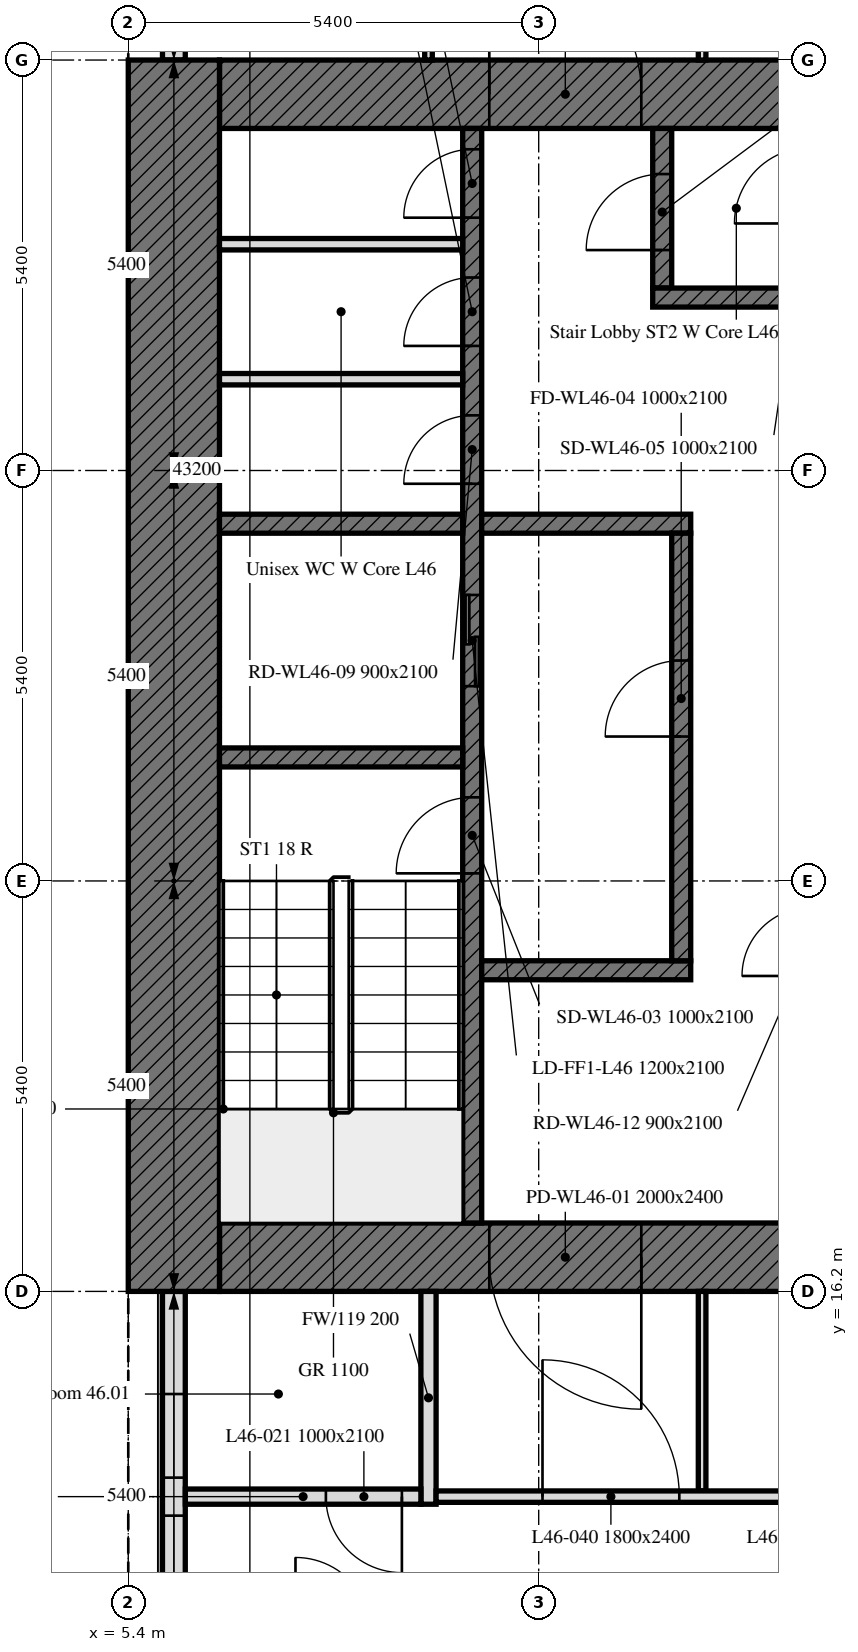
"""IFC4 building model, lengths in metres.
Left out: names, types, materials, properties, quantities, classifications, styles, units other than length and angle.
Written with IfcOpenShell. Run it as: python <this file> out.ifc"""

import sys

from ifc_helpers import new_model, si_unit, direction, frame, frame_2d, origin, place, context, subcontext, project, spatial, rectangle, extrude, element, fill, save


model = new_model("IFC4")
c1 = context("Model", 3, precision=1e-05, world=origin(), true_north=direction((0.0, 1.0)))
c2 = subcontext(c1, "Body", "Model", "MODEL_VIEW")
j1 = project(units=[si_unit("LENGTHUNIT", "METRE"), si_unit("PLANEANGLEUNIT", "RADIAN")], contexts=[c1])
p1 = place(None, origin())
s1 = spatial("IfcSite", under=j1, at=p1, CompositionType="ELEMENT")
p2 = place(p1, origin())
s2 = spatial("IfcBuilding", under=s1, at=p2, CompositionType="ELEMENT")
p3 = place(p2, frame((0.0, 0.0, 190.6)))
s3 = spatial("IfcBuildingStorey", under=s2, at=p3, CompositionType="ELEMENT", Elevation=190.6)
p4 = place(p3, frame((6.0, 43.014, 0.0), z_axis=(0.0, 0.0, 1.0), x_axis=(0.0, -1.0, 0.0)))
e1 = element("IfcWall", 1, at=p4, inside=s3, PredefinedType="SOLIDWALL", context=c2, shape_type="SweptSolid", body=[
    extrude(rectangle(XDim=10.614, YDim=0.3, at=frame_2d((5.307, 0.0))), origin(), (0.0, 0.0, 1.0), 3.0),
])
p5 = place(p4, frame((1.789, 0.0, 0.9)))
e2 = element("IfcOpeningElement", 2, at=p5, cuts=e1, PredefinedType="OPENING", context=c2, shape_type="SweptSolid", body=[
    extrude(rectangle(XDim=0.65, YDim=1.7, at=frame_2d((0.325, 0.85))), frame((0.0, 0.16, 0.0), z_axis=(0.0, -1.0, 0.0), x_axis=(1.0, 0.0, 0.0)), (0.0, 0.0, 1.0), 0.32),
])
p6 = place(p4, frame((2.589, 0.0, 0.9)))
e3 = element("IfcOpeningElement", 3, at=p6, cuts=e1, PredefinedType="OPENING", context=c2, shape_type="SweptSolid", body=[
    extrude(rectangle(XDim=0.65, YDim=1.7, at=frame_2d((0.325, 0.85))), frame((0.0, 0.16, 0.0), z_axis=(0.0, -1.0, 0.0), x_axis=(1.0, 0.0, 0.0)), (0.0, 0.0, 1.0), 0.32),
])
p7 = place(p4, frame((6.214, 0.0, 0.9)))
e4 = element("IfcOpeningElement", 4, at=p7, cuts=e1, PredefinedType="OPENING", context=c2, shape_type="SweptSolid", body=[
    extrude(rectangle(XDim=3.4, YDim=1.7, at=frame_2d((1.7, 0.85))), frame((0.0, 0.16, 0.0), z_axis=(0.0, -1.0, 0.0), x_axis=(1.0, 0.0, 0.0)), (0.0, 0.0, 1.0), 0.32),
])
p8 = place(p3, frame((6.0, 16.2, 0.0), z_axis=(0.0, 0.0, 1.0), x_axis=(0.0, -1.0, 0.0)))
e5 = element("IfcWall", 5, at=p8, inside=s3, PredefinedType="SOLIDWALL", context=c2, shape_type="SweptSolid", body=[
    extrude(rectangle(XDim=5.214, YDim=0.3, at=frame_2d((2.607, 0.0))), origin(), (0.0, 0.0, 1.0), 3.0),
])
p9 = place(p8, frame((1.35, 0.0, 0.9)))
e6 = element("IfcOpeningElement", 6, at=p9, cuts=e5, PredefinedType="OPENING", context=c2, shape_type="SweptSolid", body=[
    extrude(rectangle(XDim=1.1, YDim=1.7, at=frame_2d((0.55, 0.85))), frame((0.0, 0.16, 0.0), z_axis=(0.0, -1.0, 0.0), x_axis=(1.0, 0.0, 0.0)), (0.0, 0.0, 1.0), 0.32),
])
p10 = place(p8, frame((2.95, 0.0, 0.9)))
e7 = element("IfcOpeningElement", 7, at=p10, cuts=e5, PredefinedType="OPENING", context=c2, shape_type="SweptSolid", body=[
    extrude(rectangle(XDim=1.1, YDim=1.7, at=frame_2d((0.55, 0.85))), frame((0.0, 0.16, 0.0), z_axis=(0.0, -1.0, 0.0), x_axis=(1.0, 0.0, 0.0)), (0.0, 0.0, 1.0), 0.32),
])
p11 = place(p3, frame((17.7, 16.65, 0.0), z_axis=(0.0, 0.0, 1.0), x_axis=(-1.0, 0.0, 0.0)))
e8 = element("IfcWall", 8, at=p11, inside=s3, PredefinedType="SOLIDWALL", context=c2, shape_type="SweptSolid", body=[
    extrude(rectangle(XDim=11.1, YDim=0.9, at=frame_2d((5.55, 0.0))), origin(), (0.0, 0.0, 1.0), 3.0),
])
p12 = place(p11, frame((5.55, 0.0, 0.0)))
e9 = element("IfcOpeningElement", 9, at=p12, cuts=e8, PredefinedType="OPENING", context=c2, shape_type="SweptSolid", body=[
    extrude(rectangle(XDim=2.0, YDim=2.4, at=frame_2d((1.0, 1.2))), frame((0.0, 0.45, 0.0), z_axis=(0.0, -1.0, 0.0), x_axis=(1.0, 0.0, 0.0)), (0.0, 0.0, 1.0), 0.9),
])
p13 = place(p3, frame((6.6, 31.95, 0.0), z_axis=(0.0, 0.0, 1.0), x_axis=(1.0, 0.0, 0.0)))
e10 = element("IfcWall", 10, at=p13, inside=s3, PredefinedType="SOLIDWALL", context=c2, shape_type="SweptSolid", body=[
    extrude(rectangle(XDim=11.1, YDim=0.9, at=frame_2d((5.55, 0.0))), origin(), (0.0, 0.0, 1.0), 3.0),
])
p14 = place(p13, frame((3.55, 0.0, 0.0)))
e11 = element("IfcOpeningElement", 11, at=p14, cuts=e10, PredefinedType="OPENING", context=c2, shape_type="SweptSolid", body=[
    extrude(rectangle(XDim=2.0, YDim=2.4, at=frame_2d((1.0, 1.2))), frame((0.0, 0.45, 0.0), z_axis=(0.0, -1.0, 0.0), x_axis=(1.0, 0.0, 0.0)), (0.0, 0.0, 1.0), 0.9),
])
p15 = place(p3, frame((6.0, 16.2, 0.0), z_axis=(0.0, 0.0, 1.0), x_axis=(0.0, 1.0, 0.0)))
e12 = element("IfcWall", 12, at=p15, inside=s3, PredefinedType="SOLIDWALL", context=c2, shape_type="SweptSolid", body=[
    extrude(rectangle(XDim=16.2, YDim=1.2, at=frame_2d((8.1, 0.0))), origin(), (0.0, 0.0, 1.0), 3.0),
])
p16 = place(p3, frame((9.925, 17.1, 0.0), z_axis=(0.0, 0.0, 1.0), x_axis=(0.0, 1.0, 0.0)))
e13 = element("IfcWall", 13, at=p16, inside=s3, PredefinedType="SOLIDWALL", context=c2, shape_type="SweptSolid", body=[
    extrude(rectangle(XDim=14.4, YDim=0.25, at=frame_2d((7.2, 0.0))), origin(), (0.0, 0.0, 1.0), 3.0),
])
p17 = place(p16, frame((4.6, 0.0, 0.0)))
e14 = element("IfcOpeningElement", 14, at=p17, cuts=e13, PredefinedType="OPENING", context=c2, shape_type="SweptSolid", body=[
    extrude(rectangle(XDim=1.0, YDim=2.1, at=frame_2d((0.5, 1.05))), frame((0.0, 0.125, 0.0), z_axis=(0.0, -1.0, 0.0), x_axis=(1.0, 0.0, 0.0)), (0.0, 0.0, 1.0), 0.25),
])
p18 = place(p16, frame((7.062, 0.0, 0.0)))
e15 = element("IfcOpeningElement", 15, at=p18, cuts=e13, PredefinedType="OPENING", context=c2, shape_type="SweptSolid", body=[
    extrude(rectangle(XDim=1.2, YDim=2.1, at=frame_2d((0.6, 1.05))), frame((0.0, 0.125, 0.0), z_axis=(0.0, -1.0, 0.0), x_axis=(1.0, 0.0, 0.0)), (0.0, 0.0, 1.0), 0.25),
])
p19 = place(p16, frame((9.726, 0.0, 0.0)))
e16 = element("IfcOpeningElement", 16, at=p19, cuts=e13, PredefinedType="OPENING", context=c2, shape_type="SweptSolid", body=[
    extrude(rectangle(XDim=0.9, YDim=2.1, at=frame_2d((0.45, 1.05))), frame((0.0, 0.125, 0.0), z_axis=(0.0, -1.0, 0.0), x_axis=(1.0, 0.0, 0.0)), (0.0, 0.0, 1.0), 0.25),
])
p20 = place(p16, frame((11.539, 0.0, 0.0)))
e17 = element("IfcOpeningElement", 17, at=p20, cuts=e13, PredefinedType="OPENING", context=c2, shape_type="SweptSolid", body=[
    extrude(rectangle(XDim=0.9, YDim=2.1, at=frame_2d((0.45, 1.05))), frame((0.0, 0.125, 0.0), z_axis=(0.0, -1.0, 0.0), x_axis=(1.0, 0.0, 0.0)), (0.0, 0.0, 1.0), 0.25),
])
p21 = place(p16, frame((13.226, 0.0, 0.0)))
e18 = element("IfcOpeningElement", 18, at=p21, cuts=e13, PredefinedType="OPENING", context=c2, shape_type="SweptSolid", body=[
    extrude(rectangle(XDim=0.9, YDim=2.1, at=frame_2d((0.45, 1.05))), frame((0.0, 0.125, 0.0), z_axis=(0.0, -1.0, 0.0), x_axis=(1.0, 0.0, 0.0)), (0.0, 0.0, 1.0), 0.25),
])
for number, where, z_axis, x_axis in (
    (19, (6.6, 23.225, 0.0), (0.0, 0.0, 1.0), (1.0, 0.0, 0.0)),
    (20, (6.6, 26.3, 0.0), (0.0, 0.0, 1.0), (1.0, 0.0, 0.0)),
):
    element("IfcWall", number, at=place(p3, frame(where, z_axis=z_axis, x_axis=x_axis)), inside=s3, PredefinedType="SOLIDWALL", context=c2, shape_type="SweptSolid", body=[
        extrude(rectangle(XDim=3.2, YDim=0.25, at=frame_2d((1.6, 0.0))), origin(), (0.0, 0.0, 1.0), 3.0),
    ])
for number, where, z_axis, x_axis in (
    (21, (10.05, 26.3, 0.0), (0.0, 0.0, 1.0), (1.0, 0.0, 0.0)),
    (22, (10.05, 20.425, 0.0), (0.0, 0.0, 1.0), (1.0, 0.0, 0.0)),
):
    element("IfcWall", number, at=place(p3, frame(where, z_axis=z_axis, x_axis=x_axis)), inside=s3, PredefinedType="SOLIDWALL", context=c2, shape_type="SweptSolid", body=[
        extrude(rectangle(XDim=2.75, YDim=0.25, at=frame_2d((1.375, 0.0))), origin(), (0.0, 0.0, 1.0), 3.0),
    ])
p22 = place(p3, frame((12.425, 29.4, 0.0), z_axis=(0.0, 0.0, 1.0), x_axis=(0.0, 1.0, 0.0)))
e23 = element("IfcWall", 23, at=p22, inside=s3, PredefinedType="SOLIDWALL", context=c2, shape_type="SweptSolid", body=[
    extrude(rectangle(XDim=2.1, YDim=0.25, at=frame_2d((1.05, 0.0))), origin(), (0.0, 0.0, 1.0), 3.0),
])
p23 = place(p22, frame((0.5, 0.0, 0.0)))
e24 = element("IfcOpeningElement", 24, at=p23, cuts=e23, PredefinedType="OPENING", context=c2, shape_type="SweptSolid", body=[
    extrude(rectangle(XDim=1.0, YDim=2.1, at=frame_2d((0.5, 1.05))), frame((0.0, 0.125, 0.0), z_axis=(0.0, -1.0, 0.0), x_axis=(1.0, 0.0, 0.0)), (0.0, 0.0, 1.0), 0.25),
])
p24 = place(p3, frame((12.3, 29.275, 0.0), z_axis=(0.0, 0.0, 1.0), x_axis=(1.0, 0.0, 0.0)))
e25 = element("IfcWall", 25, at=p24, inside=s3, PredefinedType="SOLIDWALL", context=c2, shape_type="SweptSolid", body=[
    extrude(rectangle(XDim=1.95, YDim=0.25, at=frame_2d((0.975, 0.0))), origin(), (0.0, 0.0, 1.0), 3.0),
])
p25 = place(p3, frame((12.675, 20.55, 0.0), z_axis=(0.0, 0.0, 1.0), x_axis=(0.0, 1.0, 0.0)))
e26 = element("IfcWall", 26, at=p25, inside=s3, PredefinedType="SOLIDWALL", context=c2, shape_type="SweptSolid", body=[
    extrude(rectangle(XDim=5.625, YDim=0.25, at=frame_2d((2.812, 0.0))), origin(), (0.0, 0.0, 1.0), 3.0),
])
p26 = place(p25, frame((2.95, 0.0, 0.0)))
e27 = element("IfcOpeningElement", 27, at=p26, cuts=e26, PredefinedType="OPENING", context=c2, shape_type="SweptSolid", body=[
    extrude(rectangle(XDim=1.0, YDim=2.1, at=frame_2d((0.5, 1.05))), frame((0.0, 0.125, 0.0), z_axis=(0.0, -1.0, 0.0), x_axis=(1.0, 0.0, 0.0)), (0.0, 0.0, 1.0), 0.25),
])
for number, where, z_axis, x_axis in (
    (28, (6.6, 28.201, 0.0), (0.0, 0.0, 1.0), (1.0, 0.0, 0.0)),
    (29, (6.6, 29.977, 0.0), (0.0, 0.0, 1.0), (1.0, 0.0, 0.0)),
):
    element("IfcWall", number, at=place(p3, frame(where, z_axis=z_axis, x_axis=x_axis)), inside=s3, PredefinedType="PARTITIONING", context=c2, shape_type="SweptSolid", body=[
        extrude(rectangle(XDim=3.2, YDim=0.15, at=frame_2d((1.6, 0.0))), origin(), (0.0, 0.0, 1.0), 3.0),
    ])
for number, where, z_axis, x_axis in (
    (30, (9.35, 39.525, 0.0), (0.0, 0.0, 1.0), (0.0, -1.0, 0.0)),
    (31, (12.95, 32.4, 0.0), (0.0, 0.0, 1.0), (0.0, 1.0, 0.0)),
):
    element("IfcWall", number, at=place(p3, frame(where, z_axis=z_axis, x_axis=x_axis)), inside=s3, PredefinedType="PARTITIONING", context=c2, shape_type="SweptSolid", body=[
        extrude(rectangle(XDim=7.125, YDim=0.1, at=frame_2d((3.562, 0.0))), origin(), (0.0, 0.0, 1.0), 3.0),
    ])
p27 = place(p3, frame((9.35, 16.2, 0.0), z_axis=(0.0, 0.0, 1.0), x_axis=(0.0, -1.0, 0.0)))
e32 = element("IfcWall", 32, at=p27, inside=s3, PredefinedType="PARTITIONING", context=c2, shape_type="SweptSolid", body=[
    extrude(rectangle(XDim=2.8, YDim=0.2, at=frame_2d((1.4, 0.0))), origin(), (0.0, 0.0, 1.0), 3.0),
])
p28 = place(p3, frame((12.95, 13.575, 0.0), z_axis=(0.0, 0.0, 1.0), x_axis=(0.0, 1.0, 0.0)))
e33 = element("IfcWall", 33, at=p28, inside=s3, PredefinedType="PARTITIONING", context=c2, shape_type="SweptSolid", body=[
    extrude(rectangle(XDim=2.625, YDim=0.1, at=frame_2d((1.312, 0.0))), origin(), (0.0, 0.0, 1.0), 3.0),
])
p29 = place(p3, frame((9.45, 13.5, 0.0), z_axis=(0.0, 0.0, 1.0), x_axis=(1.0, 0.0, 0.0)))
e34 = element("IfcWall", 34, at=p29, inside=s3, PredefinedType="PARTITIONING", context=c2, shape_type="SweptSolid", body=[
    extrude(rectangle(XDim=33.675, YDim=0.15, at=frame_2d((16.837, 0.0))), origin(), (0.0, 0.0, 1.0), 3.0),
])
p30 = place(p29, frame((8.95, 0.0, 0.0)))
e35 = element("IfcOpeningElement", 35, at=p30, cuts=e34, PredefinedType="OPENING", context=c2, shape_type="SweptSolid", body=[
    extrude(rectangle(XDim=1.0, YDim=2.1, at=frame_2d((0.5, 1.05))), frame((0.0, 0.075, 0.0), z_axis=(0.0, -1.0, 0.0), x_axis=(1.0, 0.0, 0.0)), (0.0, 0.0, 1.0), 0.15),
])
p31 = place(p29, frame((15.517, 0.0, 0.0)))
e36 = element("IfcOpeningElement", 36, at=p31, cuts=e34, PredefinedType="OPENING", context=c2, shape_type="SweptSolid", body=[
    extrude(rectangle(XDim=1.0, YDim=2.1, at=frame_2d((0.5, 1.05))), frame((0.0, 0.075, 0.0), z_axis=(0.0, -1.0, 0.0), x_axis=(1.0, 0.0, 0.0)), (0.0, 0.0, 1.0), 0.15),
])
p32 = place(p29, frame((24.075, 0.0, 0.0)))
e37 = element("IfcOpeningElement", 37, at=p32, cuts=e34, PredefinedType="OPENING", context=c2, shape_type="SweptSolid", body=[
    extrude(rectangle(XDim=1.0, YDim=2.1, at=frame_2d((0.5, 1.05))), frame((0.0, 0.075, 0.0), z_axis=(0.0, -1.0, 0.0), x_axis=(1.0, 0.0, 0.0)), (0.0, 0.0, 1.0), 0.15),
])
p33 = place(p29, frame((31.275, 0.0, 0.0)))
e38 = element("IfcOpeningElement", 38, at=p33, cuts=e34, PredefinedType="OPENING", context=c2, shape_type="SweptSolid", body=[
    extrude(rectangle(XDim=1.0, YDim=2.1, at=frame_2d((0.5, 1.05))), frame((0.0, 0.075, 0.0), z_axis=(0.0, -1.0, 0.0), x_axis=(1.0, 0.0, 0.0)), (0.0, 0.0, 1.0), 0.15),
])
p34 = place(p29, frame((4.625, 0.0, 0.0)))
e39 = element("IfcOpeningElement", 39, at=p34, cuts=e34, PredefinedType="OPENING", context=c2, shape_type="SweptSolid", body=[
    extrude(rectangle(XDim=1.0, YDim=2.1, at=frame_2d((0.5, 1.05))), frame((0.0, 0.075, 0.0), z_axis=(0.0, -1.0, 0.0), x_axis=(1.0, 0.0, 0.0)), (0.0, 0.0, 1.0), 0.15),
])
p35 = place(p29, frame((1.4, 0.0, 0.0)))
e40 = element("IfcOpeningElement", 40, at=p35, cuts=e34, PredefinedType="OPENING", context=c2, shape_type="SweptSolid", body=[
    extrude(rectangle(XDim=1.8, YDim=2.4, at=frame_2d((0.9, 1.2))), frame((0.0, 0.075, 0.0), z_axis=(0.0, -1.0, 0.0), x_axis=(1.0, 0.0, 0.0)), (0.0, 0.0, 1.0), 0.15),
])
p36 = place(p29, frame((26.5, 0.0, 0.0)))
e41 = element("IfcOpeningElement", 41, at=p36, cuts=e34, PredefinedType="OPENING", context=c2, shape_type="SweptSolid", body=[
    extrude(rectangle(XDim=1.8, YDim=2.4, at=frame_2d((0.9, 1.2))), frame((0.0, 0.075, 0.0), z_axis=(0.0, -1.0, 0.0), x_axis=(1.0, 0.0, 0.0)), (0.0, 0.0, 1.0), 0.15),
])
p37 = place(p3, frame((9.25, 13.5, 0.0), z_axis=(0.0, 0.0, 1.0), x_axis=(-1.0, 0.0, 0.0)))
e42 = element("IfcWall", 42, at=p37, inside=s3, PredefinedType="PARTITIONING", context=c2, shape_type="SweptSolid", body=[
    extrude(rectangle(XDim=3.099, YDim=0.2, at=frame_2d((1.55, 0.0))), origin(), (0.0, 0.0, 1.0), 3.0),
])
p38 = place(p37, frame((0.25, 0.0, 0.0)))
e43 = element("IfcOpeningElement", 43, at=p38, cuts=e42, PredefinedType="OPENING", context=c2, shape_type="SweptSolid", body=[
    extrude(rectangle(XDim=1.0, YDim=2.1, at=frame_2d((0.5, 1.05))), frame((0.0, 0.1, 0.0), z_axis=(0.0, -1.0, 0.0), x_axis=(1.0, 0.0, 0.0)), (0.0, 0.0, 1.0), 0.2),
])
p39 = place(p9, origin())
e44 = element("IfcWindow", 44, at=p39, inside=s3, PartitioningType="SINGLE_PANEL", PredefinedType="WINDOW", context=c2, shape_type="SweptSolid", body=[
    extrude(rectangle(XDim=1.1, YDim=1.7, at=frame_2d((0.55, 0.85))), frame((0.0, 0.03, 0.0), z_axis=(0.0, -1.0, 0.0), x_axis=(1.0, 0.0, 0.0)), (0.0, 0.0, 1.0), 0.06),
])
fill(e6, e44)
p40 = place(p10, origin())
e45 = element("IfcWindow", 45, at=p40, inside=s3, PartitioningType="SINGLE_PANEL", PredefinedType="WINDOW", context=c2, shape_type="SweptSolid", body=[
    extrude(rectangle(XDim=1.1, YDim=1.7, at=frame_2d((0.55, 0.85))), frame((0.0, 0.03, 0.0), z_axis=(0.0, -1.0, 0.0), x_axis=(1.0, 0.0, 0.0)), (0.0, 0.0, 1.0), 0.06),
])
fill(e7, e45)
p41 = place(p12, origin())
e46 = element("IfcDoor", 46, at=p41, inside=s3, OperationType="DOUBLE_DOOR_SINGLE_SWING", PredefinedType="DOOR", context=c2, shape_type="SweptSolid", body=[
    extrude(rectangle(XDim=2.0, YDim=2.4, at=frame_2d((1.0, 1.2))), frame((0.0, 0.025, 0.0), z_axis=(0.0, -1.0, 0.0), x_axis=(1.0, 0.0, 0.0)), (0.0, 0.0, 1.0), 0.05),
])
fill(e9, e46)
p42 = place(p14, origin())
e47 = element("IfcDoor", 47, at=p42, inside=s3, OperationType="DOUBLE_DOOR_SINGLE_SWING", PredefinedType="DOOR", context=c2, shape_type="SweptSolid", body=[
    extrude(rectangle(XDim=2.0, YDim=2.4, at=frame_2d((1.0, 1.2))), frame((0.0, 0.025, 0.0), z_axis=(0.0, -1.0, 0.0), x_axis=(1.0, 0.0, 0.0)), (0.0, 0.0, 1.0), 0.05),
])
fill(e11, e47)
p43 = place(p17, origin())
e48 = element("IfcDoor", 48, at=p43, inside=s3, OperationType="SINGLE_SWING_LEFT", PredefinedType="DOOR", context=c2, shape_type="SweptSolid", body=[
    extrude(rectangle(XDim=1.0, YDim=2.1, at=frame_2d((0.5, 1.05))), frame((0.0, 0.025, 0.0), z_axis=(0.0, -1.0, 0.0), x_axis=(1.0, 0.0, 0.0)), (0.0, 0.0, 1.0), 0.05),
])
fill(e14, e48)
p44 = place(p26, origin())
e49 = element("IfcDoor", 49, at=p44, inside=s3, OperationType="SINGLE_SWING_LEFT", PredefinedType="DOOR", context=c2, shape_type="SweptSolid", body=[
    extrude(rectangle(XDim=1.0, YDim=2.1, at=frame_2d((0.5, 1.05))), frame((0.0, 0.025, 0.0), z_axis=(0.0, -1.0, 0.0), x_axis=(1.0, 0.0, 0.0)), (0.0, 0.0, 1.0), 0.05),
])
fill(e27, e49)
p45 = place(p23, origin())
e50 = element("IfcDoor", 50, at=p45, inside=s3, OperationType="SINGLE_SWING_LEFT", PredefinedType="DOOR", context=c2, shape_type="SweptSolid", body=[
    extrude(rectangle(XDim=1.0, YDim=2.1, at=frame_2d((0.5, 1.05))), frame((0.0, 0.025, 0.0), z_axis=(0.0, -1.0, 0.0), x_axis=(1.0, 0.0, 0.0)), (0.0, 0.0, 1.0), 0.05),
])
fill(e24, e50)
p46 = place(p18, origin())
e51 = element("IfcDoor", 51, at=p46, inside=s3, OperationType="DOUBLE_DOOR_SLIDING", PredefinedType="DOOR", context=c2, shape_type="SweptSolid", body=[
    extrude(rectangle(XDim=1.2, YDim=2.1, at=frame_2d((0.6, 1.05))), frame((0.0, 0.025, 0.0), z_axis=(0.0, -1.0, 0.0), x_axis=(1.0, 0.0, 0.0)), (0.0, 0.0, 1.0), 0.05),
])
fill(e15, e51)
p47 = place(p19, origin())
e52 = element("IfcDoor", 52, at=p47, inside=s3, OperationType="SINGLE_SWING_LEFT", PredefinedType="DOOR", context=c2, shape_type="SweptSolid", body=[
    extrude(rectangle(XDim=0.9, YDim=2.1, at=frame_2d((0.45, 1.05))), frame((0.0, 0.025, 0.0), z_axis=(0.0, -1.0, 0.0), x_axis=(1.0, 0.0, 0.0)), (0.0, 0.0, 1.0), 0.05),
])
fill(e16, e52)
p48 = place(p20, origin())
e53 = element("IfcDoor", 53, at=p48, inside=s3, OperationType="SINGLE_SWING_LEFT", PredefinedType="DOOR", context=c2, shape_type="SweptSolid", body=[
    extrude(rectangle(XDim=0.9, YDim=2.1, at=frame_2d((0.45, 1.05))), frame((0.0, 0.025, 0.0), z_axis=(0.0, -1.0, 0.0), x_axis=(1.0, 0.0, 0.0)), (0.0, 0.0, 1.0), 0.05),
])
fill(e17, e53)
p49 = place(p21, origin())
e54 = element("IfcDoor", 54, at=p49, inside=s3, OperationType="SINGLE_SWING_LEFT", PredefinedType="DOOR", context=c2, shape_type="SweptSolid", body=[
    extrude(rectangle(XDim=0.9, YDim=2.1, at=frame_2d((0.45, 1.05))), frame((0.0, 0.025, 0.0), z_axis=(0.0, -1.0, 0.0), x_axis=(1.0, 0.0, 0.0)), (0.0, 0.0, 1.0), 0.05),
])
fill(e18, e54)
p50 = place(p38, origin())
e55 = element("IfcDoor", 55, at=p50, inside=s3, OperationType="SINGLE_SWING_LEFT", PredefinedType="DOOR", context=c2, shape_type="SweptSolid", body=[
    extrude(rectangle(XDim=1.0, YDim=2.1, at=frame_2d((0.5, 1.05))), frame((0.0, 0.025, 0.0), z_axis=(0.0, -1.0, 0.0), x_axis=(1.0, 0.0, 0.0)), (0.0, 0.0, 1.0), 0.05),
])
fill(e43, e55)
p51 = place(p35, origin())
e56 = element("IfcDoor", 56, at=p51, inside=s3, OperationType="DOUBLE_DOOR_SINGLE_SWING", PredefinedType="DOOR", context=c2, shape_type="SweptSolid", body=[
    extrude(rectangle(XDim=1.8, YDim=2.4, at=frame_2d((0.9, 1.2))), frame((0.0, 0.025, 0.0), z_axis=(0.0, -1.0, 0.0), x_axis=(1.0, 0.0, 0.0)), (0.0, 0.0, 1.0), 0.05),
])
fill(e40, e56)
save(model, sys.argv[1])
